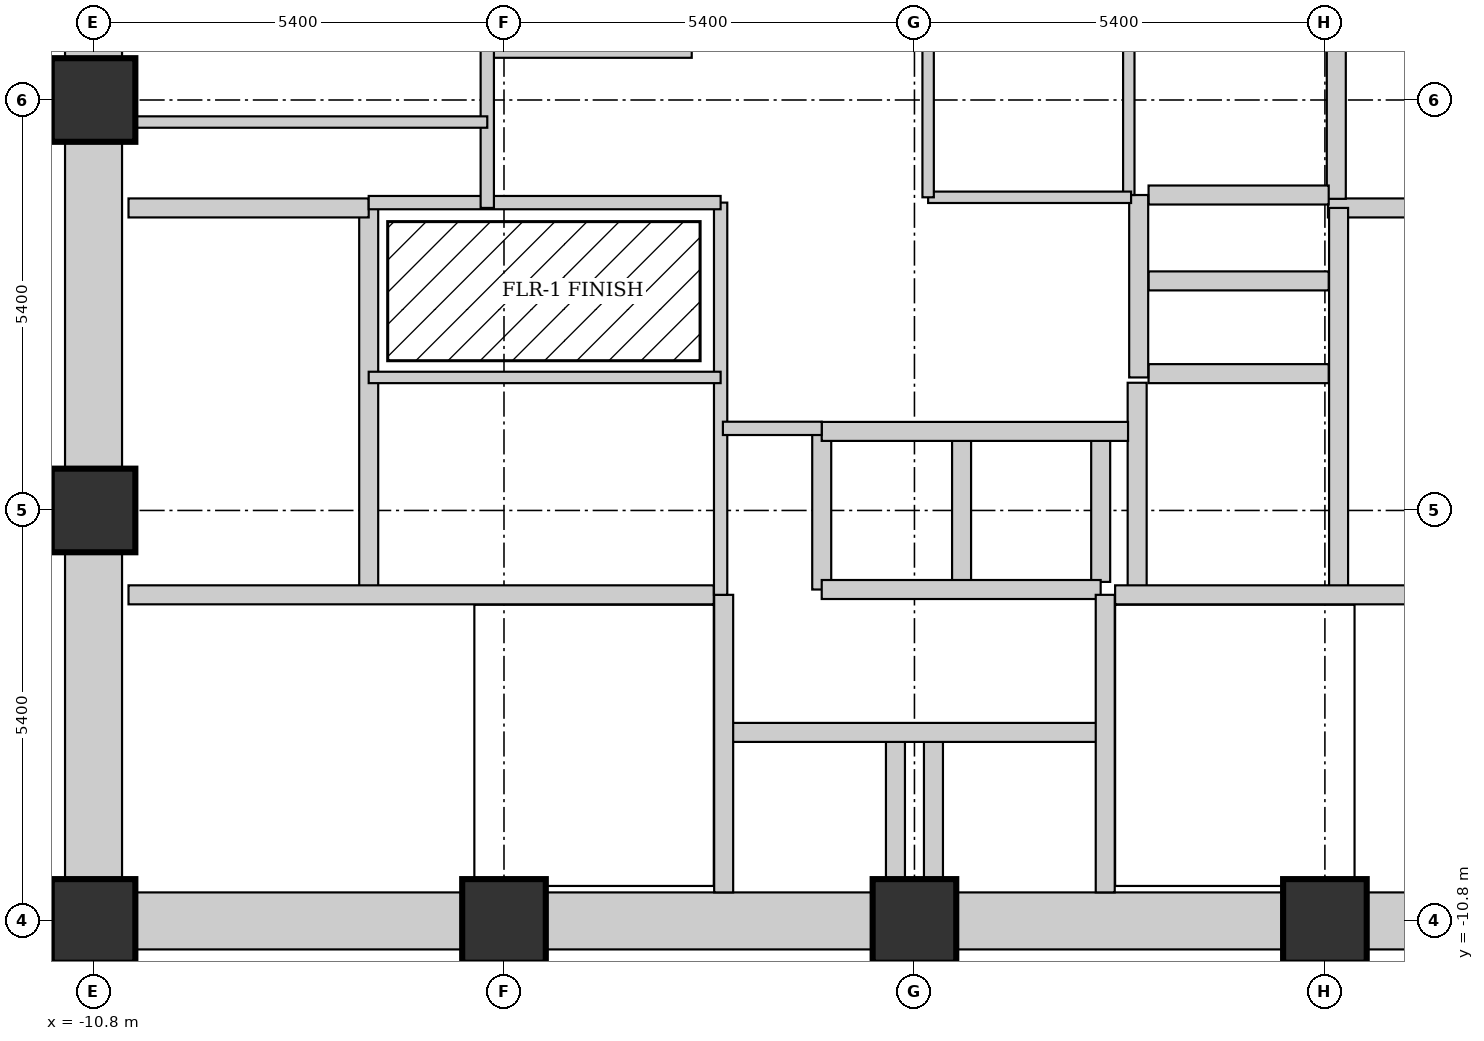
"""IFC4 building model, lengths in metres.
Left out: names, types, materials, properties, quantities, classifications, styles, units other than length and angle.
Written with IfcOpenShell. Run it as: python <this file> out.ifc"""

import sys

from ifc_helpers import new_model, si_unit, direction, frame, frame_2d, origin, origin_2d, place, context, subcontext, project, spatial, rectangle, extrude, element, fill, save


model = new_model("IFC4")
c1 = context("Model", 3, precision=1e-05, world=origin(), true_north=direction((0.0, 1.0)))
c2 = subcontext(c1, "Body", "Model", "MODEL_VIEW")
j1 = project(units=[si_unit("LENGTHUNIT", "METRE"), si_unit("PLANEANGLEUNIT", "RADIAN")], contexts=[c1])
p1 = place(None, origin())
s1 = spatial("IfcSite", under=j1, at=p1, CompositionType="ELEMENT")
p2 = place(p1, origin())
s2 = spatial("IfcBuilding", under=s1, at=p2, CompositionType="ELEMENT")
p3 = place(p2, frame((0.0, 0.0, 83.25)))
s3 = spatial("IfcBuildingStorey", under=s2, at=p3, CompositionType="ELEMENT", Elevation=83.25)
for number, where, z_axis, x_axis in (
    (1, (-10.8, -10.8, 0.0), (0.0, 0.0, 1.0), (1.0, 0.0, 0.0)),
    (2, (-10.8, -5.4, 0.0), (0.0, 0.0, 1.0), (1.0, 0.0, 0.0)),
    (3, (-10.8, 0.0, 0.0), (0.0, 0.0, 1.0), (1.0, 0.0, 0.0)),
    (4, (-5.4, -10.8, 0.0), (0.0, 0.0, 1.0), (1.0, 0.0, 0.0)),
    (5, (0.0, -10.8, 0.0), (0.0, 0.0, 1.0), (1.0, 0.0, 0.0)),
    (6, (5.4, -10.8, 0.0), (0.0, 0.0, 1.0), (1.0, 0.0, 0.0)),
):
    element("IfcColumn", number, at=place(p3, frame(where, z_axis=z_axis, x_axis=x_axis)), inside=s3, PredefinedType="COLUMN", context=c2, shape_type="SweptSolid", body=[
        extrude(rectangle(XDim=1.1, YDim=1.1, at=origin_2d()), origin(), (0.0, 0.0, 1.0), 3.75),
    ])
for number, where, z_axis, x_axis in (
    (7, (-10.24, -10.8, 0.0), (0.0, 0.0, 1.0), (1.0, 0.0, 0.0)),
    (8, (-10.8, -10.24, 0.0), (0.0, 0.0, 1.0), (0.0, 1.0, 0.0)),
    (9, (-4.84, -10.8, 0.0), (0.0, 0.0, 1.0), (1.0, 0.0, 0.0)),
):
    element("IfcWall", number, at=place(p3, frame(where, z_axis=z_axis, x_axis=x_axis)), inside=s3, PredefinedType="SHEAR", context=c2, shape_type="SweptSolid", body=[
        extrude(rectangle(XDim=4.28, YDim=0.75, at=frame_2d((2.14, 0.0))), origin(), (0.0, 0.0, 1.0), 3.75),
    ])
p4 = place(p3, frame((-10.8, -4.84, 0.0), z_axis=(0.0, 0.0, 1.0), x_axis=(0.0, 1.0, 0.0)))
e10 = element("IfcWall", 10, at=p4, inside=s3, PredefinedType="SHEAR", context=c2, shape_type="SweptSolid", body=[
    extrude(rectangle(XDim=4.28, YDim=0.75, at=frame_2d((2.14, 0.0))), origin(), (0.0, 0.0, 1.0), 3.75),
])
p5 = place(p4, frame((1.59, 0.0, 0.0)))
e11 = element("IfcOpeningElement", 11, at=p5, cuts=e10, PredefinedType="OPENING", context=c2, shape_type="SweptSolid", body=[
    extrude(rectangle(XDim=1.1, YDim=2.1, at=frame_2d((0.55, 1.05))), frame((0.0, 0.385, 0.0), z_axis=(0.0, -1.0, 0.0), x_axis=(1.0, 0.0, 0.0)), (0.0, 0.0, 1.0), 0.77),
])
p6 = place(p3, frame((0.56, -10.8, 0.0), z_axis=(0.0, 0.0, 1.0), x_axis=(1.0, 0.0, 0.0)))
e12 = element("IfcWall", 12, at=p6, inside=s3, PredefinedType="SHEAR", context=c2, shape_type="SweptSolid", body=[
    extrude(rectangle(XDim=4.28, YDim=0.75, at=frame_2d((2.14, 0.0))), origin(), (0.0, 0.0, 1.0), 3.75),
])
p7 = place(p3, frame((-10.8, 0.56, 0.0), z_axis=(0.0, 0.0, 1.0), x_axis=(0.0, 1.0, 0.0)))
e13 = element("IfcWall", 13, at=p7, inside=s3, PredefinedType="SHEAR", context=c2, shape_type="SweptSolid", body=[
    extrude(rectangle(XDim=4.28, YDim=0.75, at=frame_2d((2.14, 0.0))), origin(), (0.0, 0.0, 1.0), 3.75),
])
p8 = place(p7, frame((1.59, 0.0, 0.0)))
e14 = element("IfcOpeningElement", 14, at=p8, cuts=e13, PredefinedType="OPENING", context=c2, shape_type="SweptSolid", body=[
    extrude(rectangle(XDim=1.1, YDim=2.1, at=frame_2d((0.55, 1.05))), frame((0.0, 0.385, 0.0), z_axis=(0.0, -1.0, 0.0), x_axis=(1.0, 0.0, 0.0)), (0.0, 0.0, 1.0), 0.77),
])
p9 = place(p3, frame((5.96, -10.8, 0.0), z_axis=(0.0, 0.0, 1.0), x_axis=(1.0, 0.0, 0.0)))
e15 = element("IfcWall", 15, at=p9, inside=s3, PredefinedType="SHEAR", context=c2, shape_type="SweptSolid", body=[
    extrude(rectangle(XDim=4.28, YDim=0.75, at=frame_2d((2.14, 0.0))), origin(), (0.0, 0.0, 1.0), 3.75),
])
p10 = place(p3, frame((2.93, -6.51, 0.0), z_axis=(0.0, 0.0, 1.0), x_axis=(0.0, 1.0, 0.0)))
e16 = element("IfcWall", 16, at=p10, inside=s3, PredefinedType="SHEAR", context=c2, shape_type="SweptSolid", body=[
    extrude(rectangle(XDim=2.79, YDim=0.25, at=frame_2d((1.395, 0.0))), origin(), (0.0, 0.0, 1.0), 3.75),
])
p11 = place(p3, frame((5.44, -1.42, 0.0), z_axis=(0.0, 0.0, 1.0), x_axis=(1.0, 0.0, 0.0)))
e17 = element("IfcWall", 17, at=p11, inside=s3, PredefinedType="SHEAR", context=c2, shape_type="SweptSolid", body=[
    extrude(rectangle(XDim=4.9, YDim=0.25, at=frame_2d((2.45, 0.0))), origin(), (0.0, 0.0, 1.0), 3.75),
])
p12 = place(p3, frame((3.08, -3.6, 0.0), z_axis=(0.0, 0.0, 1.0), x_axis=(1.0, 0.0, 0.0)))
e18 = element("IfcWall", 18, at=p12, inside=s3, PredefinedType="SHEAR", context=c2, shape_type="SweptSolid", body=[
    extrude(rectangle(XDim=2.37, YDim=0.25, at=frame_2d((1.185, 0.0))), origin(), (0.0, 0.0, 1.0), 3.75),
])
p13 = place(p3, frame((5.58, -6.51, 0.0), z_axis=(0.0, 0.0, 1.0), x_axis=(0.0, 1.0, 0.0)))
e19 = element("IfcWall", 19, at=p13, inside=s3, PredefinedType="SHEAR", context=c2, shape_type="SweptSolid", body=[
    extrude(rectangle(XDim=5.09, YDim=0.25, at=frame_2d((2.545, 0.0))), origin(), (0.0, 0.0, 1.0), 3.75),
])
p14 = place(p13, frame((0.85, 0.0, 0.0)))
e20 = element("IfcOpeningElement", 20, at=p14, cuts=e19, PredefinedType="OPENING", context=c2, shape_type="SweptSolid", body=[
    extrude(rectangle(XDim=1.1, YDim=2.1, at=frame_2d((0.55, 1.05))), frame((0.0, 0.135, 0.0), z_axis=(0.0, -1.0, 0.0), x_axis=(1.0, 0.0, 0.0)), (0.0, 0.0, 1.0), 0.27),
])
for number, where, z_axis, x_axis in (
    (21, (0.62, -6.34, 0.0), (0.0, 0.0, 1.0), (0.0, 1.0, 0.0)),
    (22, (2.45, -6.34, 0.0), (0.0, 0.0, 1.0), (0.0, 1.0, 0.0)),
):
    element("IfcWall", number, at=place(p3, frame(where, z_axis=z_axis, x_axis=x_axis)), inside=s3, PredefinedType="SHEAR", context=c2, shape_type="SweptSolid", body=[
        extrude(rectangle(XDim=1.88, YDim=0.25, at=frame_2d((0.94, 0.0))), origin(), (0.0, 0.0, 1.0), 3.75),
    ])
for number, where, z_axis, x_axis in (
    (23, (-0.25, -10.25, 0.0), (0.0, 0.0, 1.0), (0.0, 1.0, 0.0)),
    (24, (0.25, -10.25, 0.0), (0.0, 0.0, 1.0), (0.0, 1.0, 0.0)),
):
    element("IfcWall", number, at=place(p3, frame(where, z_axis=z_axis, x_axis=x_axis)), inside=s3, PredefinedType="SHEAR", context=c2, shape_type="SweptSolid", body=[
        extrude(rectangle(XDim=1.81, YDim=0.25, at=frame_2d((0.905, 0.0))), origin(), (0.0, 0.0, 1.0), 3.75),
    ])
p15 = place(p3, frame((-1.22, -6.44, 0.0), z_axis=(0.0, 0.0, 1.0), x_axis=(0.0, 1.0, 0.0)))
e25 = element("IfcWall", 25, at=p15, inside=s3, PredefinedType="SHEAR", context=c2, shape_type="SweptSolid", body=[
    extrude(rectangle(XDim=2.08, YDim=0.25, at=frame_2d((1.04, 0.0))), origin(), (0.0, 0.0, 1.0), 3.75),
])
p16 = place(p3, frame((-1.22, -6.44, 0.0), z_axis=(0.0, 0.0, 1.0), x_axis=(1.0, 0.0, 0.0)))
e26 = element("IfcWall", 26, at=p16, inside=s3, PredefinedType="SHEAR", context=c2, shape_type="SweptSolid", body=[
    extrude(rectangle(XDim=3.67, YDim=0.25, at=frame_2d((1.835, 0.0))), origin(), (0.0, 0.0, 1.0), 3.75),
])
p17 = place(p3, frame((-2.48, -8.32, 0.0), z_axis=(0.0, 0.0, 1.0), x_axis=(1.0, 0.0, 0.0)))
e27 = element("IfcWall", 27, at=p17, inside=s3, PredefinedType="SHEAR", context=c2, shape_type="SweptSolid", body=[
    extrude(rectangle(XDim=4.93, YDim=0.25, at=frame_2d((2.465, 0.0))), origin(), (0.0, 0.0, 1.0), 3.75),
])
p18 = place(p3, frame((-1.22, -4.36, 0.0), z_axis=(0.0, 0.0, 1.0), x_axis=(1.0, 0.0, 0.0)))
e28 = element("IfcWall", 28, at=p18, inside=s3, PredefinedType="SHEAR", context=c2, shape_type="SweptSolid", body=[
    extrude(rectangle(XDim=4.03, YDim=0.25, at=frame_2d((2.015, 0.0))), origin(), (0.0, 0.0, 1.0), 3.75),
])
p19 = place(p3, frame((5.55, -1.3, 0.0), z_axis=(0.0, 0.0, 1.0), x_axis=(0.0, 1.0, 0.0)))
e29 = element("IfcWall", 29, at=p19, inside=s3, PredefinedType="SHEAR", context=c2, shape_type="SweptSolid", body=[
    extrude(rectangle(XDim=2.04, YDim=0.25, at=frame_2d((1.02, 0.0))), origin(), (0.0, 0.0, 1.0), 3.75),
])
for number, where, z_axis, x_axis in (
    (30, (3.08, -2.38, 0.0), (0.0, 0.0, 1.0), (1.0, 0.0, 0.0)),
    (31, (3.08, -1.25, 0.0), (0.0, 0.0, 1.0), (1.0, 0.0, 0.0)),
):
    element("IfcWall", number, at=place(p3, frame(where, z_axis=z_axis, x_axis=x_axis)), inside=s3, PredefinedType="SHEAR", context=c2, shape_type="SweptSolid", body=[
        extrude(rectangle(XDim=2.37, YDim=0.25, at=frame_2d((1.185, 0.0))), origin(), (0.0, 0.0, 1.0), 3.75),
    ])
p20 = place(p3, frame((2.95, -3.65, 0.0), z_axis=(0.0, 0.0, 1.0), x_axis=(0.0, 1.0, 0.0)))
e32 = element("IfcWall", 32, at=p20, inside=s3, PredefinedType="SHEAR", context=c2, shape_type="SweptSolid", body=[
    extrude(rectangle(XDim=2.4, YDim=0.25, at=frame_2d((1.2, 0.0))), origin(), (0.0, 0.0, 1.0), 3.75),
])
p21 = place(p20, frame((0.775, 0.0, 0.0)))
e33 = element("IfcOpeningElement", 33, at=p21, cuts=e32, PredefinedType="OPENING", context=c2, shape_type="SweptSolid", body=[
    extrude(rectangle(XDim=0.85, YDim=2.1, at=frame_2d((0.425, 1.05))), frame((0.0, 0.135, 0.0), z_axis=(0.0, -1.0, 0.0), x_axis=(1.0, 0.0, 0.0)), (0.0, 0.0, 1.0), 0.27),
])
p22 = place(p3, frame((2.64, -6.51, 0.0), z_axis=(0.0, 0.0, 1.0), x_axis=(1.0, 0.0, 0.0)))
e34 = element("IfcWall", 34, at=p22, inside=s3, PredefinedType="SHEAR", context=c2, shape_type="SweptSolid", body=[
    extrude(rectangle(XDim=7.7, YDim=0.25, at=frame_2d((3.85, 0.0))), origin(), (0.0, 0.0, 1.0), 3.75),
])
p23 = place(p22, frame((6.0, 0.0, 0.0)))
e35 = element("IfcOpeningElement", 35, at=p23, cuts=e34, PredefinedType="OPENING", context=c2, shape_type="SweptSolid", body=[
    extrude(rectangle(XDim=0.95, YDim=2.1, at=frame_2d((0.475, 1.05))), frame((0.0, 0.135, 0.0), z_axis=(0.0, -1.0, 0.0), x_axis=(1.0, 0.0, 0.0)), (0.0, 0.0, 1.0), 0.27),
])
for number, where, z_axis, x_axis in (
    (36, (2.51, -10.425, 0.0), (0.0, 0.0, 1.0), (0.0, 1.0, 0.0)),
    (37, (-2.51, -10.425, 0.0), (0.0, 0.0, 1.0), (0.0, 1.0, 0.0)),
):
    element("IfcWall", number, at=place(p3, frame(where, z_axis=z_axis, x_axis=x_axis)), inside=s3, PredefinedType="SHEAR", context=c2, shape_type="SweptSolid", body=[
        extrude(rectangle(XDim=3.915, YDim=0.25, at=frame_2d((1.958, 0.0))), origin(), (0.0, 0.0, 1.0), 3.75),
    ])
p24 = place(p3, frame((-7.18, -6.51, 0.0), z_axis=(0.0, 0.0, 1.0), x_axis=(0.0, 1.0, 0.0)))
e38 = element("IfcWall", 38, at=p24, inside=s3, PredefinedType="SHEAR", context=c2, shape_type="SweptSolid", body=[
    extrude(rectangle(XDim=5.09, YDim=0.25, at=frame_2d((2.545, 0.0))), origin(), (0.0, 0.0, 1.0), 3.75),
])
p25 = place(p3, frame((-10.34, -1.42, 0.0), z_axis=(0.0, 0.0, 1.0), x_axis=(1.0, 0.0, 0.0)))
e39 = element("IfcWall", 39, at=p25, inside=s3, PredefinedType="SHEAR", context=c2, shape_type="SweptSolid", body=[
    extrude(rectangle(XDim=3.16, YDim=0.25, at=frame_2d((1.58, 0.0))), origin(), (0.0, 0.0, 1.0), 3.75),
])
p26 = place(p3, frame((-10.34, -6.51, 0.0), z_axis=(0.0, 0.0, 1.0), x_axis=(1.0, 0.0, 0.0)))
e40 = element("IfcWall", 40, at=p26, inside=s3, PredefinedType="SHEAR", context=c2, shape_type="SweptSolid", body=[
    extrude(rectangle(XDim=7.7, YDim=0.25, at=frame_2d((3.85, 0.0))), origin(), (0.0, 0.0, 1.0), 3.75),
])
p27 = place(p26, frame((0.35, 0.0, 0.0)))
e41 = element("IfcOpeningElement", 41, at=p27, cuts=e40, PredefinedType="OPENING", context=c2, shape_type="SweptSolid", body=[
    extrude(rectangle(XDim=1.1, YDim=2.1, at=frame_2d((0.55, 1.05))), frame((0.0, 0.135, 0.0), z_axis=(0.0, -1.0, 0.0), x_axis=(1.0, 0.0, 0.0)), (0.0, 0.0, 1.0), 0.27),
])
p28 = place(p3, frame((-5.58, 0.68, 0.0), z_axis=(0.0, 0.0, 1.0), x_axis=(1.0, 0.0, 0.0)))
e42 = element("IfcWall", 42, at=p28, inside=s3, PredefinedType="SHEAR", context=c2, shape_type="SweptSolid", body=[
    extrude(rectangle(XDim=2.65, YDim=0.25, at=frame_2d((1.325, 0.0))), origin(), (0.0, 0.0, 1.0), 3.75),
])
p29 = place(p3, frame((2.82, -1.25, 0.0), z_axis=(0.0, 0.0, 1.0), x_axis=(0.0, 1.0, 0.0)))
e43 = element("IfcWall", 43, at=p29, inside=s3, PredefinedType="PARTITIONING", context=c2, shape_type="SweptSolid", body=[
    extrude(rectangle(XDim=2.77, YDim=0.15, at=frame_2d((1.385, 0.0))), origin(), (0.0, 0.0, 1.0), 3.57),
])
p30 = place(p3, frame((0.18, -1.28, 0.0), z_axis=(0.0, 0.0, 1.0), x_axis=(1.0, 0.0, 0.0)))
e44 = element("IfcWall", 44, at=p30, inside=s3, PredefinedType="PARTITIONING", context=c2, shape_type="SweptSolid", body=[
    extrude(rectangle(XDim=2.67, YDim=0.15, at=frame_2d((1.335, 0.0))), origin(), (0.0, 0.0, 1.0), 3.57),
])
p31 = place(p3, frame((0.18, -1.28, 0.0), z_axis=(0.0, 0.0, 1.0), x_axis=(0.0, 1.0, 0.0)))
e45 = element("IfcWall", 45, at=p31, inside=s3, PredefinedType="PARTITIONING", context=c2, shape_type="SweptSolid", body=[
    extrude(rectangle(XDim=2.8, YDim=0.15, at=frame_2d((1.4, 0.0))), origin(), (0.0, 0.0, 1.0), 3.57),
])
p32 = place(p31, frame((0.85, 0.0, 0.0)))
e46 = element("IfcOpeningElement", 46, at=p32, cuts=e45, PredefinedType="OPENING", context=c2, shape_type="SweptSolid", body=[
    extrude(rectangle(XDim=0.85, YDim=2.1, at=frame_2d((0.425, 1.05))), frame((0.0, 0.085, 0.0), z_axis=(0.0, -1.0, 0.0), x_axis=(1.0, 0.0, 0.0)), (0.0, 0.0, 1.0), 0.17),
])
p33 = place(p3, frame((-2.55, -6.51, 0.0), z_axis=(0.0, 0.0, 1.0), x_axis=(0.0, 1.0, 0.0)))
e47 = element("IfcWall", 47, at=p33, inside=s3, PredefinedType="PARTITIONING", context=c2, shape_type="SweptSolid", body=[
    extrude(rectangle(XDim=5.16, YDim=0.175, at=frame_2d((2.58, 0.0))), origin(), (0.0, 0.0, 1.0), 3.57),
])
p34 = place(p33, frame((3.45, 0.0, 0.0)))
e48 = element("IfcOpeningElement", 48, at=p34, cuts=e47, PredefinedType="OPENING", context=c2, shape_type="SweptSolid", body=[
    extrude(rectangle(XDim=0.85, YDim=2.1, at=frame_2d((0.425, 1.05))), frame((0.0, 0.097, 0.0), z_axis=(0.0, -1.0, 0.0), x_axis=(1.0, 0.0, 0.0)), (0.0, 0.0, 1.0), 0.195),
])
p35 = place(p3, frame((-7.18, -3.65, 0.0), z_axis=(0.0, 0.0, 1.0), x_axis=(1.0, 0.0, 0.0)))
e49 = element("IfcWall", 49, at=p35, inside=s3, PredefinedType="PARTITIONING", context=c2, shape_type="SweptSolid", body=[
    extrude(rectangle(XDim=4.63, YDim=0.15, at=frame_2d((2.315, 0.0))), origin(), (0.0, 0.0, 1.0), 3.57),
])
p36 = place(p35, frame((1.0, 0.0, 0.0)))
e50 = element("IfcOpeningElement", 50, at=p36, cuts=e49, PredefinedType="OPENING", context=c2, shape_type="SweptSolid", body=[
    extrude(rectangle(XDim=0.85, YDim=2.1, at=frame_2d((0.425, 1.05))), frame((0.0, 0.085, 0.0), z_axis=(0.0, -1.0, 0.0), x_axis=(1.0, 0.0, 0.0)), (0.0, 0.0, 1.0), 0.17),
])
p37 = place(p3, frame((-7.18, -1.35, 0.0), z_axis=(0.0, 0.0, 1.0), x_axis=(1.0, 0.0, 0.0)))
e51 = element("IfcWall", 51, at=p37, inside=s3, PredefinedType="PARTITIONING", context=c2, shape_type="SweptSolid", body=[
    extrude(rectangle(XDim=4.63, YDim=0.175, at=frame_2d((2.315, 0.0))), origin(), (0.0, 0.0, 1.0), 3.57),
])
p38 = place(p3, frame((-5.62, -1.42, 0.0), z_axis=(0.0, 0.0, 1.0), x_axis=(0.0, 1.0, 0.0)))
e52 = element("IfcWall", 52, at=p38, inside=s3, PredefinedType="PARTITIONING", context=c2, shape_type="SweptSolid", body=[
    extrude(rectangle(XDim=2.14, YDim=0.175, at=frame_2d((1.07, 0.0))), origin(), (0.0, 0.0, 1.0), 3.57),
])
p39 = place(p3, frame((-10.34, -0.29, 0.0), z_axis=(0.0, 0.0, 1.0), x_axis=(1.0, 0.0, 0.0)))
e53 = element("IfcWall", 53, at=p39, inside=s3, PredefinedType="PARTITIONING", context=c2, shape_type="SweptSolid", body=[
    extrude(rectangle(XDim=4.72, YDim=0.15, at=frame_2d((2.36, 0.0))), origin(), (0.0, 0.0, 1.0), 3.57),
])
p40 = place(p39, frame((1.8, 0.0, 0.0)))
e54 = element("IfcOpeningElement", 54, at=p40, cuts=e53, PredefinedType="OPENING", context=c2, shape_type="SweptSolid", body=[
    extrude(rectangle(XDim=0.85, YDim=2.1, at=frame_2d((0.425, 1.05))), frame((0.0, 0.085, 0.0), z_axis=(0.0, -1.0, 0.0), x_axis=(1.0, 0.0, 0.0)), (0.0, 0.0, 1.0), 0.17),
])
p41 = place(p3, frame((-2.52, -4.32, 0.0), z_axis=(0.0, 0.0, 1.0), x_axis=(1.0, 0.0, 0.0)))
e55 = element("IfcWall", 55, at=p41, inside=s3, PredefinedType="PARTITIONING", context=c2, shape_type="SweptSolid", body=[
    extrude(rectangle(XDim=1.3, YDim=0.175, at=frame_2d((0.65, 0.0))), origin(), (0.0, 0.0, 1.0), 3.57),
])
p42 = place(p41, frame((0.22, 0.0, 0.0)))
e56 = element("IfcOpeningElement", 56, at=p42, cuts=e55, PredefinedType="OPENING", context=c2, shape_type="SweptSolid", body=[
    extrude(rectangle(XDim=0.85, YDim=2.1, at=frame_2d((0.425, 1.05))), frame((0.0, 0.097, 0.0), z_axis=(0.0, -1.0, 0.0), x_axis=(1.0, 0.0, 0.0)), (0.0, 0.0, 1.0), 0.195),
])
p43 = place(p32, origin())
e57 = element("IfcDoor", 57, at=p43, inside=s3, OperationType="SINGLE_SWING_RIGHT", PredefinedType="DOOR", context=c2, shape_type="SweptSolid", body=[
    extrude(rectangle(XDim=0.85, YDim=2.1, at=frame_2d((0.425, 1.05))), frame((0.0, 0.025, 0.0), z_axis=(0.0, -1.0, 0.0), x_axis=(1.0, 0.0, 0.0)), (0.0, 0.0, 1.0), 0.05),
])
fill(e46, e57)
p44 = place(p27, origin())
e58 = element("IfcDoor", 58, at=p44, inside=s3, OperationType="SINGLE_SWING_RIGHT", PredefinedType="DOOR", context=c2, shape_type="SweptSolid", body=[
    extrude(rectangle(XDim=1.1, YDim=2.1, at=frame_2d((0.55, 1.05))), frame((0.0, 0.025, 0.0), z_axis=(0.0, -1.0, 0.0), x_axis=(1.0, 0.0, 0.0)), (0.0, 0.0, 1.0), 0.05),
])
fill(e41, e58)
p45 = place(p21, origin())
e59 = element("IfcDoor", 59, at=p45, inside=s3, OperationType="SINGLE_SWING_LEFT", PredefinedType="DOOR", context=c2, shape_type="SweptSolid", body=[
    extrude(rectangle(XDim=0.85, YDim=2.1, at=frame_2d((0.425, 1.05))), frame((0.0, 0.025, 0.0), z_axis=(0.0, -1.0, 0.0), x_axis=(1.0, 0.0, 0.0)), (0.0, 0.0, 1.0), 0.05),
])
fill(e33, e59)
p46 = place(p5, origin())
e60 = element("IfcDoor", 60, at=p46, inside=s3, OperationType="SINGLE_SWING_LEFT", PredefinedType="DOOR", context=c2, shape_type="SweptSolid", body=[
    extrude(rectangle(XDim=1.1, YDim=2.1, at=frame_2d((0.55, 1.05))), frame((0.0, 0.025, 0.0), z_axis=(0.0, -1.0, 0.0), x_axis=(1.0, 0.0, 0.0)), (0.0, 0.0, 1.0), 0.05),
])
fill(e11, e60)
p47 = place(p40, origin())
e61 = element("IfcDoor", 61, at=p47, inside=s3, OperationType="SINGLE_SWING_RIGHT", PredefinedType="DOOR", context=c2, shape_type="SweptSolid", body=[
    extrude(rectangle(XDim=0.85, YDim=2.1, at=frame_2d((0.425, 1.05))), frame((0.0, 0.025, 0.0), z_axis=(0.0, -1.0, 0.0), x_axis=(1.0, 0.0, 0.0)), (0.0, 0.0, 1.0), 0.05),
])
fill(e54, e61)
p48 = place(p14, origin())
e62 = element("IfcDoor", 62, at=p48, inside=s3, OperationType="SLIDING_TO_RIGHT", PredefinedType="DOOR", context=c2, shape_type="SweptSolid", body=[
    extrude(rectangle(XDim=1.1, YDim=2.1, at=frame_2d((0.55, 1.05))), frame((0.0, 0.025, 0.0), z_axis=(0.0, -1.0, 0.0), x_axis=(1.0, 0.0, 0.0)), (0.0, 0.0, 1.0), 0.05),
])
fill(e20, e62)
p49 = place(p42, origin())
e63 = element("IfcDoor", 63, at=p49, inside=s3, OperationType="SINGLE_SWING_LEFT", PredefinedType="DOOR", context=c2, shape_type="SweptSolid", body=[
    extrude(rectangle(XDim=0.85, YDim=2.1, at=frame_2d((0.425, 1.05))), frame((0.0, 0.025, 0.0), z_axis=(0.0, -1.0, 0.0), x_axis=(1.0, 0.0, 0.0)), (0.0, 0.0, 1.0), 0.05),
])
fill(e56, e63)
p50 = place(p34, origin())
e64 = element("IfcDoor", 64, at=p50, inside=s3, OperationType="SINGLE_SWING_LEFT", PredefinedType="DOOR", context=c2, shape_type="SweptSolid", body=[
    extrude(rectangle(XDim=0.85, YDim=2.1, at=frame_2d((0.425, 1.05))), frame((0.0, 0.025, 0.0), z_axis=(0.0, -1.0, 0.0), x_axis=(1.0, 0.0, 0.0)), (0.0, 0.0, 1.0), 0.05),
])
fill(e48, e64)
p51 = place(p36, origin())
e65 = element("IfcDoor", 65, at=p51, inside=s3, OperationType="SINGLE_SWING_LEFT", PredefinedType="DOOR", context=c2, shape_type="SweptSolid", body=[
    extrude(rectangle(XDim=0.85, YDim=2.1, at=frame_2d((0.425, 1.05))), frame((0.0, 0.025, 0.0), z_axis=(0.0, -1.0, 0.0), x_axis=(1.0, 0.0, 0.0)), (0.0, 0.0, 1.0), 0.05),
])
fill(e50, e65)
save(model, sys.argv[1])
